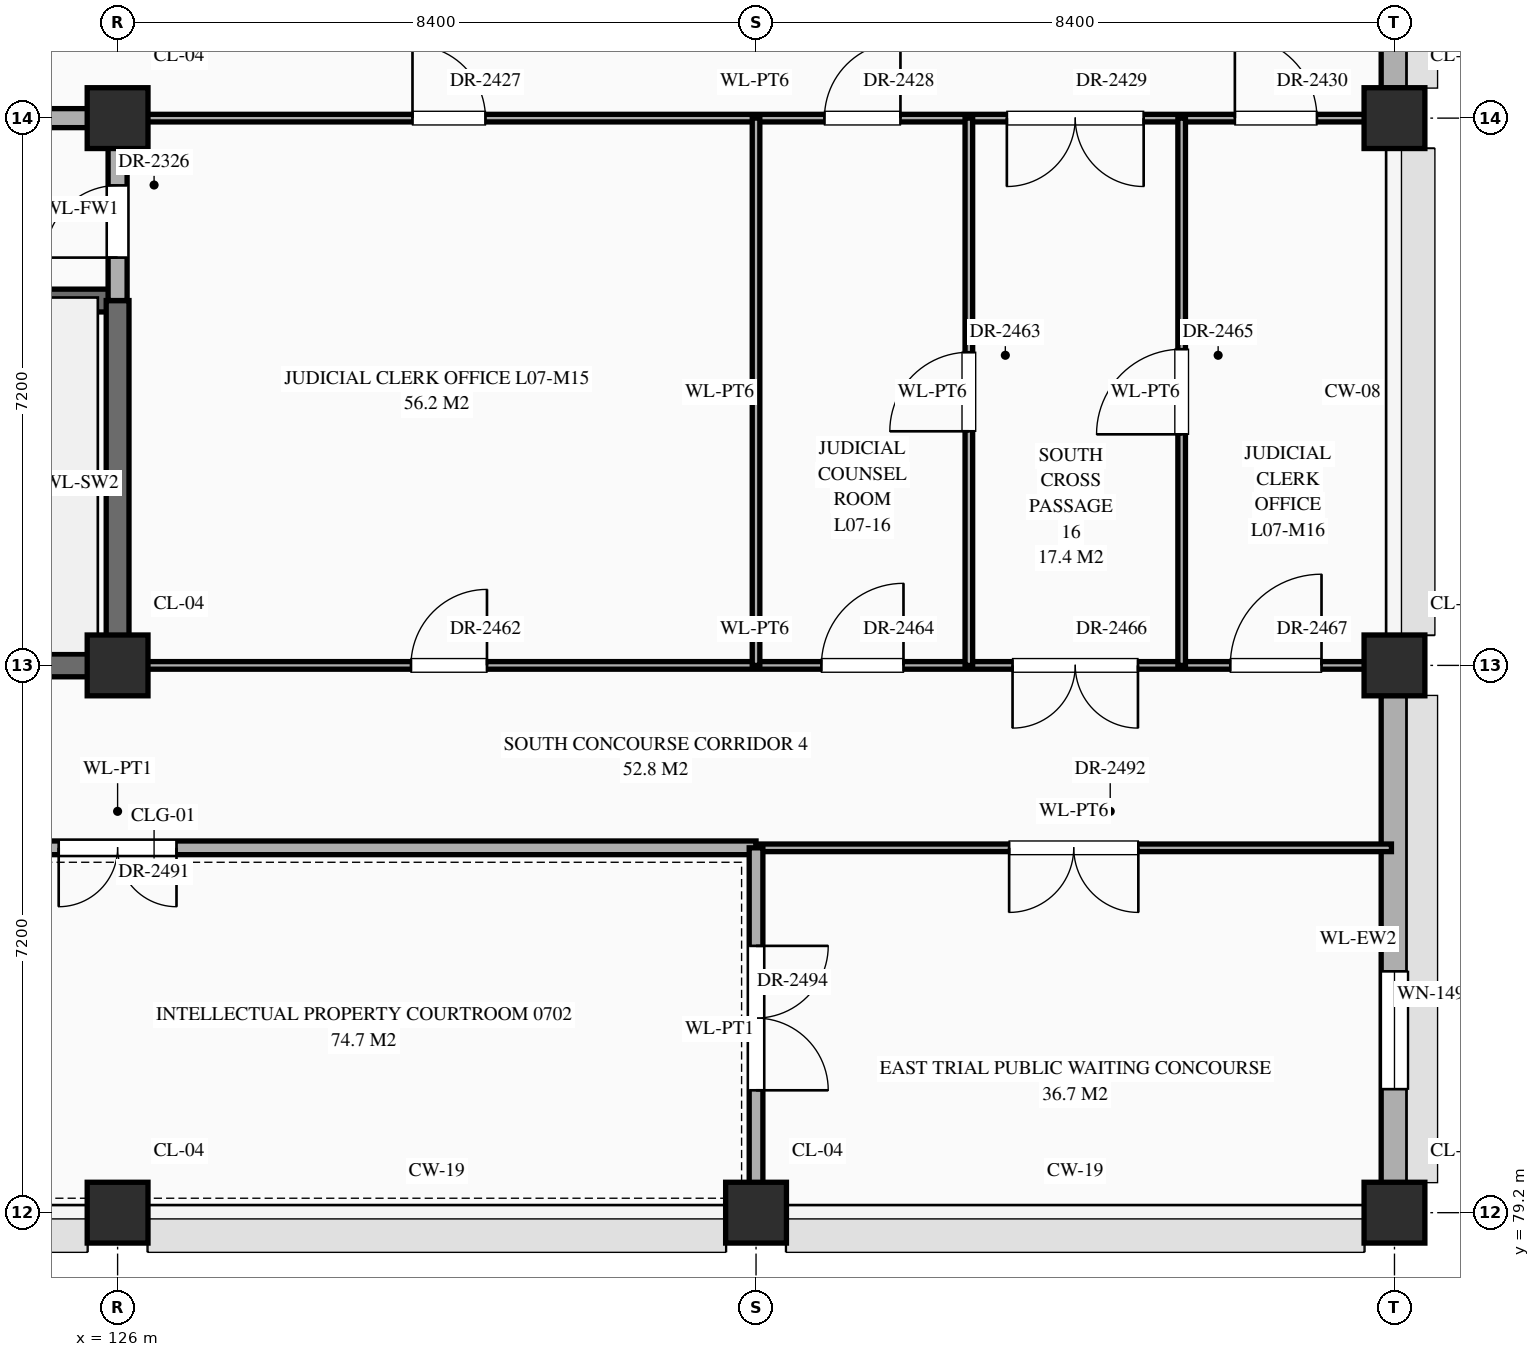
"""IFC4 building model, lengths in metres.
Left out: names, types, materials, properties, quantities, classifications, styles, units other than length and angle.
Written with IfcOpenShell. Run it as: python <this file> out.ifc"""

import sys

from ifc_helpers import new_model, si_unit, direction, frame, frame_2d, origin, origin_2d, place, context, subcontext, project, spatial, rectangle, extrude, element, fill, save


model = new_model("IFC4")
c1 = context("Model", 3, precision=1e-05, world=origin(), true_north=direction((0.0, 1.0)))
c2 = subcontext(c1, "Body", "Model", "MODEL_VIEW")
j1 = project(units=[si_unit("LENGTHUNIT", "METRE"), si_unit("PLANEANGLEUNIT", "RADIAN")], contexts=[c1])
p1 = place(None, origin())
s1 = spatial("IfcSite", under=j1, at=p1, CompositionType="ELEMENT")
p2 = place(p1, origin())
s2 = spatial("IfcBuilding", under=s1, at=p2, CompositionType="ELEMENT")
p3 = place(p2, frame((0.0, 0.0, 30.6)))
s3 = spatial("IfcBuildingStorey", under=s2, at=p3, CompositionType="ELEMENT", Elevation=30.6)
for number, where, z_axis, x_axis in (
    (1, (126.0, 79.2, 0.0), (0.0, 0.0, 1.0), (1.0, 0.0, 0.0)),
    (2, (126.0, 86.4, 0.0), (0.0, 0.0, 1.0), (1.0, 0.0, 0.0)),
    (3, (126.0, 93.6, 0.0), (0.0, 0.0, 1.0), (1.0, 0.0, 0.0)),
    (4, (134.4, 79.2, 0.0), (0.0, 0.0, 1.0), (1.0, 0.0, 0.0)),
    (5, (142.8, 79.2, 0.0), (0.0, 0.0, 1.0), (1.0, 0.0, 0.0)),
    (6, (142.8, 86.4, 0.0), (0.0, 0.0, 1.0), (1.0, 0.0, 0.0)),
    (7, (142.8, 93.6, 0.0), (0.0, 0.0, 1.0), (1.0, 0.0, 0.0)),
):
    element("IfcColumn", number, at=place(p3, frame(where, z_axis=z_axis, x_axis=x_axis)), inside=s3, PredefinedType="COLUMN", context=c2, shape_type="SweptSolid", body=[
        extrude(rectangle(XDim=0.8, YDim=0.8, at=origin_2d()), origin(), (0.0, 0.0, 1.0), 4.5),
    ])
p4 = place(p3, frame((142.8, 79.595, 0.0), z_axis=(0.0, 0.0, 1.0), x_axis=(0.0, 1.0, 0.0)))
e8 = element("IfcWall", 8, at=p4, inside=s3, PredefinedType="STANDARD", context=c2, shape_type="SweptSolid", body=[
    extrude(rectangle(XDim=6.41, YDim=0.35, at=frame_2d((3.205, 0.0))), origin(), (0.0, 0.0, 1.0), 3.65),
])
p5 = place(p4, frame((1.23, 0.0, 0.85)))
e9 = element("IfcOpeningElement", 9, at=p5, cuts=e8, PredefinedType="OPENING", context=c2, shape_type="SweptSolid", body=[
    extrude(rectangle(XDim=1.55, YDim=1.74, at=frame_2d((0.775, 0.87))), frame((0.0, 0.187, 0.0), z_axis=(0.0, -1.0, 0.0), x_axis=(1.0, 0.0, 0.0)), (0.0, 0.0, 1.0), 0.374),
])
p6 = place(p3, frame((142.8, 93.995, 0.0), z_axis=(0.0, 0.0, 1.0), x_axis=(0.0, 1.0, 0.0)))
e10 = element("IfcWall", 10, at=p6, inside=s3, PredefinedType="STANDARD", context=c2, shape_type="SweptSolid", body=[
    extrude(rectangle(XDim=6.41, YDim=0.35, at=frame_2d((3.205, 0.0))), origin(), (0.0, 0.0, 1.0), 3.65),
])
p7 = place(p6, frame((4.055, 0.0, 0.85)))
e11 = element("IfcOpeningElement", 11, at=p7, cuts=e10, PredefinedType="OPENING", context=c2, shape_type="SweptSolid", body=[
    extrude(rectangle(XDim=0.9, YDim=2.12, at=frame_2d((0.45, 1.06))), frame((0.0, 0.187, 0.0), z_axis=(0.0, -1.0, 0.0), x_axis=(1.0, 0.0, 0.0)), (0.0, 0.0, 1.0), 0.374),
])
p8 = place(p3, frame((117.6, 84.0, 0.0), z_axis=(0.0, 0.0, 1.0), x_axis=(1.0, 0.0, 0.0)))
e12 = element("IfcWall", 12, at=p8, inside=s3, PredefinedType="STANDARD", context=c2, shape_type="SweptSolid", body=[
    extrude(rectangle(XDim=16.8, YDim=0.18, at=frame_2d((8.4, 0.0))), origin(), (0.0, 0.0, 1.0), 4.24),
])
p9 = place(p8, frame((7.625, 0.0, 0.0)))
e13 = element("IfcOpeningElement", 13, at=p9, cuts=e12, PredefinedType="OPENING", context=c2, shape_type="SweptSolid", body=[
    extrude(rectangle(XDim=1.55, YDim=2.35, at=frame_2d((0.775, 1.175))), frame((0.0, 0.102, 0.0), z_axis=(0.0, -1.0, 0.0), x_axis=(1.0, 0.0, 0.0)), (0.0, 0.0, 1.0), 0.204),
])
p10 = place(p3, frame((134.4, 84.0, 0.0), z_axis=(0.0, 0.0, 1.0), x_axis=(1.0, 0.0, 0.0)))
e14 = element("IfcWall", 14, at=p10, inside=s3, PredefinedType="STANDARD", context=c2, shape_type="SweptSolid", body=[
    extrude(rectangle(XDim=8.36, YDim=0.1, at=frame_2d((4.18, 0.0))), origin(), (0.0, 0.0, 1.0), 4.3),
])
p11 = place(p10, frame((3.33, 0.0, 0.0)))
e15 = element("IfcOpeningElement", 15, at=p11, cuts=e14, PredefinedType="OPENING", context=c2, shape_type="SweptSolid", body=[
    extrude(rectangle(XDim=1.7, YDim=2.45, at=frame_2d((0.85, 1.225))), frame((0.0, 0.062, 0.0), z_axis=(0.0, -1.0, 0.0), x_axis=(1.0, 0.0, 0.0)), (0.0, 0.0, 1.0), 0.124),
])
p12 = place(p3, frame((117.6, 86.4, 0.0), z_axis=(0.0, 0.0, 1.0), x_axis=(1.0, 0.0, 0.0)))
e16 = element("IfcWall", 16, at=p12, inside=s3, PredefinedType="SHEAR", context=c2, shape_type="SweptSolid", body=[
    extrude(rectangle(XDim=8.4, YDim=0.3, at=frame_2d((4.2, 0.0))), origin(), (0.0, 0.0, 1.0), 4.24),
])
p13 = place(p3, frame((126.0, 86.4, 0.0), z_axis=(0.0, 0.0, 1.0), x_axis=(1.0, 0.0, 0.0)))
e17 = element("IfcWall", 17, at=p13, inside=s3, PredefinedType="STANDARD", context=c2, shape_type="SweptSolid", body=[
    extrude(rectangle(XDim=16.76, YDim=0.1, at=frame_2d((8.38, 0.0))), origin(), (0.0, 0.0, 1.0), 3.1),
])
p14 = place(p13, frame((3.86, 0.0, 0.0)))
e18 = element("IfcOpeningElement", 18, at=p14, cuts=e17, PredefinedType="OPENING", context=c2, shape_type="SweptSolid", body=[
    extrude(rectangle(XDim=1.0, YDim=2.25, at=frame_2d((0.5, 1.125))), frame((0.0, 0.062, 0.0), z_axis=(0.0, -1.0, 0.0), x_axis=(1.0, 0.0, 0.0)), (0.0, 0.0, 1.0), 0.124),
])
p15 = place(p13, frame((9.26, 0.0, 0.0)))
e19 = element("IfcOpeningElement", 19, at=p15, cuts=e17, PredefinedType="OPENING", context=c2, shape_type="SweptSolid", body=[
    extrude(rectangle(XDim=1.08, YDim=2.25, at=frame_2d((0.54, 1.125))), frame((0.0, 0.062, 0.0), z_axis=(0.0, -1.0, 0.0), x_axis=(1.0, 0.0, 0.0)), (0.0, 0.0, 1.0), 0.124),
])
p16 = place(p13, frame((11.775, 0.0, 0.0)))
e20 = element("IfcOpeningElement", 20, at=p16, cuts=e17, PredefinedType="OPENING", context=c2, shape_type="SweptSolid", body=[
    extrude(rectangle(XDim=1.65, YDim=2.4, at=frame_2d((0.825, 1.2))), frame((0.0, 0.062, 0.0), z_axis=(0.0, -1.0, 0.0), x_axis=(1.0, 0.0, 0.0)), (0.0, 0.0, 1.0), 0.124),
])
p17 = place(p13, frame((14.64, 0.0, 0.0)))
e21 = element("IfcOpeningElement", 21, at=p17, cuts=e17, PredefinedType="OPENING", context=c2, shape_type="SweptSolid", body=[
    extrude(rectangle(XDim=1.2, YDim=2.35, at=frame_2d((0.6, 1.175))), frame((0.0, 0.062, 0.0), z_axis=(0.0, -1.0, 0.0), x_axis=(1.0, 0.0, 0.0)), (0.0, 0.0, 1.0), 0.124),
])
p18 = place(p3, frame((117.6, 91.2, 0.0), z_axis=(0.0, 0.0, 1.0), x_axis=(1.0, 0.0, 0.0)))
e22 = element("IfcWall", 22, at=p18, inside=s3, PredefinedType="SHEAR", context=c2, shape_type="SweptSolid", body=[
    extrude(rectangle(XDim=8.4, YDim=0.3, at=frame_2d((4.2, 0.0))), origin(), (0.0, 0.0, 1.0), 4.24),
])
p19 = place(p18, frame((0.65, 0.0, 0.0)))
e23 = element("IfcOpeningElement", 23, at=p19, cuts=e22, PredefinedType="OPENING", context=c2, shape_type="SweptSolid", body=[
    extrude(rectangle(XDim=1.1, YDim=2.2, at=frame_2d((0.55, 1.1))), frame((0.0, 0.162, 0.0), z_axis=(0.0, -1.0, 0.0), x_axis=(1.0, 0.0, 0.0)), (0.0, 0.0, 1.0), 0.324),
])
p20 = place(p3, frame((117.6, 93.6, 0.0), z_axis=(0.0, 0.0, 1.0), x_axis=(1.0, 0.0, 0.0)))
e24 = element("IfcWall", 24, at=p20, inside=s3, PredefinedType="STANDARD", context=c2, shape_type="SweptSolid", body=[
    extrude(rectangle(XDim=8.4, YDim=0.25, at=frame_2d((4.2, 0.0))), origin(), (0.0, 0.0, 1.0), 3.39),
])
p21 = place(p20, frame((3.2, 0.0, 0.0)))
e25 = element("IfcOpeningElement", 25, at=p21, cuts=e24, PredefinedType="OPENING", context=c2, shape_type="SweptSolid", body=[
    extrude(rectangle(XDim=2.0, YDim=2.4, at=frame_2d((1.0, 1.2))), frame((0.0, 0.137, 0.0), z_axis=(0.0, -1.0, 0.0), x_axis=(1.0, 0.0, 0.0)), (0.0, 0.0, 1.0), 0.274),
])
p22 = place(p3, frame((126.0, 93.6, 0.0), z_axis=(0.0, 0.0, 1.0), x_axis=(1.0, 0.0, 0.0)))
e26 = element("IfcWall", 26, at=p22, inside=s3, PredefinedType="STANDARD", context=c2, shape_type="SweptSolid", body=[
    extrude(rectangle(XDim=16.76, YDim=0.1, at=frame_2d((8.38, 0.0))), origin(), (0.0, 0.0, 1.0), 3.1),
])
p23 = place(p22, frame((3.88, 0.0, 0.0)))
e27 = element("IfcOpeningElement", 27, at=p23, cuts=e26, PredefinedType="OPENING", context=c2, shape_type="SweptSolid", body=[
    extrude(rectangle(XDim=0.96, YDim=2.2, at=frame_2d((0.48, 1.1))), frame((0.0, 0.062, 0.0), z_axis=(0.0, -1.0, 0.0), x_axis=(1.0, 0.0, 0.0)), (0.0, 0.0, 1.0), 0.124),
])
p24 = place(p22, frame((9.3, 0.0, 0.0)))
e28 = element("IfcOpeningElement", 28, at=p24, cuts=e26, PredefinedType="OPENING", context=c2, shape_type="SweptSolid", body=[
    extrude(rectangle(XDim=1.0, YDim=2.25, at=frame_2d((0.5, 1.125))), frame((0.0, 0.062, 0.0), z_axis=(0.0, -1.0, 0.0), x_axis=(1.0, 0.0, 0.0)), (0.0, 0.0, 1.0), 0.124),
])
p25 = place(p22, frame((11.7, 0.0, 0.0)))
e29 = element("IfcOpeningElement", 29, at=p25, cuts=e26, PredefinedType="OPENING", context=c2, shape_type="SweptSolid", body=[
    extrude(rectangle(XDim=1.8, YDim=2.5, at=frame_2d((0.9, 1.25))), frame((0.0, 0.062, 0.0), z_axis=(0.0, -1.0, 0.0), x_axis=(1.0, 0.0, 0.0)), (0.0, 0.0, 1.0), 0.124),
])
p26 = place(p22, frame((14.7, 0.0, 0.0)))
e30 = element("IfcOpeningElement", 30, at=p26, cuts=e26, PredefinedType="OPENING", context=c2, shape_type="SweptSolid", body=[
    extrude(rectangle(XDim=1.08, YDim=2.25, at=frame_2d((0.54, 1.125))), frame((0.0, 0.062, 0.0), z_axis=(0.0, -1.0, 0.0), x_axis=(1.0, 0.0, 0.0)), (0.0, 0.0, 1.0), 0.124),
])
p27 = place(p3, frame((126.0, 86.4, 0.0), z_axis=(0.0, 0.0, 1.0), x_axis=(0.0, 1.0, 0.0)))
e31 = element("IfcWall", 31, at=p27, inside=s3, PredefinedType="SHEAR", context=c2, shape_type="SweptSolid", body=[
    extrude(rectangle(XDim=4.8, YDim=0.3, at=frame_2d((2.4, 0.0))), origin(), (0.0, 0.0, 1.0), 4.24),
])
p28 = place(p3, frame((126.0, 91.2, 0.0), z_axis=(0.0, 0.0, 1.0), x_axis=(0.0, 1.0, 0.0)))
e32 = element("IfcWall", 32, at=p28, inside=s3, PredefinedType="STANDARD", context=c2, shape_type="SweptSolid", body=[
    extrude(rectangle(XDim=2.4, YDim=0.25, at=frame_2d((1.2, 0.0))), origin(), (0.0, 0.0, 1.0), 3.4),
])
p29 = place(p28, frame((0.565, 0.0, 0.0)))
e33 = element("IfcOpeningElement", 33, at=p29, cuts=e32, PredefinedType="OPENING", context=c2, shape_type="SweptSolid", body=[
    extrude(rectangle(XDim=0.95, YDim=2.15, at=frame_2d((0.475, 1.075))), frame((0.0, 0.137, 0.0), z_axis=(0.0, -1.0, 0.0), x_axis=(1.0, 0.0, 0.0)), (0.0, 0.0, 1.0), 0.274),
])
p30 = place(p3, frame((134.4, 79.24, 0.0), z_axis=(0.0, 0.0, 1.0), x_axis=(0.0, 1.0, 0.0)))
e34 = element("IfcWall", 34, at=p30, inside=s3, PredefinedType="STANDARD", context=c2, shape_type="SweptSolid", body=[
    extrude(rectangle(XDim=4.76, YDim=0.18, at=frame_2d((2.38, 0.0))), origin(), (0.0, 0.0, 1.0), 4.15),
])
p31 = place(p30, frame((1.57, 0.0, 0.0)))
e35 = element("IfcOpeningElement", 35, at=p31, cuts=e34, PredefinedType="OPENING", context=c2, shape_type="SweptSolid", body=[
    extrude(rectangle(XDim=1.9, YDim=2.5, at=frame_2d((0.95, 1.25))), frame((0.0, 0.102, 0.0), z_axis=(0.0, -1.0, 0.0), x_axis=(1.0, 0.0, 0.0)), (0.0, 0.0, 1.0), 0.204),
])
p32 = place(p3, frame((134.4, 86.4, 0.0), z_axis=(0.0, 0.0, 1.0), x_axis=(0.0, 1.0, 0.0)))
e36 = element("IfcWall", 36, at=p32, inside=s3, PredefinedType="STANDARD", context=c2, shape_type="SweptSolid", body=[
    extrude(rectangle(XDim=7.2, YDim=0.1, at=frame_2d((3.6, 0.0))), origin(), (0.0, 0.0, 1.0), 4.15),
])
p33 = place(p3, frame((137.2, 86.4, 0.0), z_axis=(0.0, 0.0, 1.0), x_axis=(0.0, 1.0, 0.0)))
e37 = element("IfcWall", 37, at=p33, inside=s3, PredefinedType="STANDARD", context=c2, shape_type="SweptSolid", body=[
    extrude(rectangle(XDim=7.2, YDim=0.1, at=frame_2d((3.6, 0.0))), origin(), (0.0, 0.0, 1.0), 4.3),
])
p34 = place(p33, frame((3.08, 0.0, 0.0)))
e38 = element("IfcOpeningElement", 38, at=p34, cuts=e37, PredefinedType="OPENING", context=c2, shape_type="SweptSolid", body=[
    extrude(rectangle(XDim=1.04, YDim=2.2, at=frame_2d((0.52, 1.1))), frame((0.0, 0.062, 0.0), z_axis=(0.0, -1.0, 0.0), x_axis=(1.0, 0.0, 0.0)), (0.0, 0.0, 1.0), 0.124),
])
p35 = place(p3, frame((140.0, 86.4, 0.0), z_axis=(0.0, 0.0, 1.0), x_axis=(0.0, 1.0, 0.0)))
e39 = element("IfcWall", 39, at=p35, inside=s3, PredefinedType="STANDARD", context=c2, shape_type="SweptSolid", body=[
    extrude(rectangle(XDim=7.2, YDim=0.1, at=frame_2d((3.6, 0.0))), origin(), (0.0, 0.0, 1.0), 4.3),
])
p36 = place(p35, frame((3.04, 0.0, 0.0)))
e40 = element("IfcOpeningElement", 40, at=p36, cuts=e39, PredefinedType="OPENING", context=c2, shape_type="SweptSolid", body=[
    extrude(rectangle(XDim=1.12, YDim=2.25, at=frame_2d((0.56, 1.125))), frame((0.0, 0.062, 0.0), z_axis=(0.0, -1.0, 0.0), x_axis=(1.0, 0.0, 0.0)), (0.0, 0.0, 1.0), 0.124),
])
p37 = place(p5, origin())
e41 = element("IfcWindow", 41, at=p37, inside=s3, PartitioningType="SINGLE_PANEL", PredefinedType="WINDOW", context=c2, shape_type="SweptSolid", body=[
    extrude(rectangle(XDim=1.55, YDim=1.74, at=frame_2d((0.775, 0.87))), frame((0.0, 0.03, 0.0), z_axis=(0.0, -1.0, 0.0), x_axis=(1.0, 0.0, 0.0)), (0.0, 0.0, 1.0), 0.06),
])
fill(e9, e41)
p38 = place(p29, origin())
e42 = element("IfcDoor", 42, at=p38, inside=s3, OperationType="SINGLE_SWING_LEFT", PredefinedType="DOOR", context=c2, shape_type="SweptSolid", body=[
    extrude(rectangle(XDim=0.95, YDim=2.15, at=frame_2d((0.475, 1.075))), frame((0.0, 0.025, 0.0), z_axis=(0.0, -1.0, 0.0), x_axis=(1.0, 0.0, 0.0)), (0.0, 0.0, 1.0), 0.05),
])
fill(e33, e42)
p39 = place(p23, origin())
e43 = element("IfcDoor", 43, at=p39, inside=s3, OperationType="SINGLE_SWING_LEFT", PredefinedType="DOOR", context=c2, shape_type="SweptSolid", body=[
    extrude(rectangle(XDim=0.96, YDim=2.2, at=frame_2d((0.48, 1.1))), frame((0.0, 0.025, 0.0), z_axis=(0.0, -1.0, 0.0), x_axis=(1.0, 0.0, 0.0)), (0.0, 0.0, 1.0), 0.05),
])
fill(e27, e43)
p40 = place(p24, origin())
e44 = element("IfcDoor", 44, at=p40, inside=s3, OperationType="SINGLE_SWING_RIGHT", PredefinedType="DOOR", context=c2, shape_type="SweptSolid", body=[
    extrude(rectangle(XDim=1.0, YDim=2.25, at=frame_2d((0.5, 1.125))), frame((0.0, 0.025, 0.0), z_axis=(0.0, -1.0, 0.0), x_axis=(1.0, 0.0, 0.0)), (0.0, 0.0, 1.0), 0.05),
])
fill(e28, e44)
p41 = place(p25, frame((1.8, 0.0, 0.0), z_axis=(0.0, 0.0, 1.0), x_axis=(-1.0, 0.0, 0.0)))
e45 = element("IfcDoor", 45, at=p41, inside=s3, OperationType="DOUBLE_DOOR_SINGLE_SWING", PredefinedType="DOOR", context=c2, shape_type="SweptSolid", body=[
    extrude(rectangle(XDim=1.8, YDim=2.5, at=frame_2d((0.9, 1.25))), frame((0.0, 0.025, 0.0), z_axis=(0.0, -1.0, 0.0), x_axis=(1.0, 0.0, 0.0)), (0.0, 0.0, 1.0), 0.05),
])
fill(e29, e45)
p42 = place(p26, origin())
e46 = element("IfcDoor", 46, at=p42, inside=s3, OperationType="SINGLE_SWING_LEFT", PredefinedType="DOOR", context=c2, shape_type="SweptSolid", body=[
    extrude(rectangle(XDim=1.08, YDim=2.25, at=frame_2d((0.54, 1.125))), frame((0.0, 0.025, 0.0), z_axis=(0.0, -1.0, 0.0), x_axis=(1.0, 0.0, 0.0)), (0.0, 0.0, 1.0), 0.05),
])
fill(e30, e46)
p43 = place(p14, origin())
e47 = element("IfcDoor", 47, at=p43, inside=s3, OperationType="SINGLE_SWING_RIGHT", PredefinedType="DOOR", context=c2, shape_type="SweptSolid", body=[
    extrude(rectangle(XDim=1.0, YDim=2.25, at=frame_2d((0.5, 1.125))), frame((0.0, 0.025, 0.0), z_axis=(0.0, -1.0, 0.0), x_axis=(1.0, 0.0, 0.0)), (0.0, 0.0, 1.0), 0.05),
])
fill(e18, e47)
p44 = place(p34, origin())
e48 = element("IfcDoor", 48, at=p44, inside=s3, OperationType="SINGLE_SWING_LEFT", PredefinedType="DOOR", context=c2, shape_type="SweptSolid", body=[
    extrude(rectangle(XDim=1.04, YDim=2.2, at=frame_2d((0.52, 1.1))), frame((0.0, 0.025, 0.0), z_axis=(0.0, -1.0, 0.0), x_axis=(1.0, 0.0, 0.0)), (0.0, 0.0, 1.0), 0.05),
])
fill(e38, e48)
p45 = place(p15, origin())
e49 = element("IfcDoor", 49, at=p45, inside=s3, OperationType="SINGLE_SWING_RIGHT", PredefinedType="DOOR", context=c2, shape_type="SweptSolid", body=[
    extrude(rectangle(XDim=1.08, YDim=2.25, at=frame_2d((0.54, 1.125))), frame((0.0, 0.025, 0.0), z_axis=(0.0, -1.0, 0.0), x_axis=(1.0, 0.0, 0.0)), (0.0, 0.0, 1.0), 0.05),
])
fill(e19, e49)
p46 = place(p36, origin())
e50 = element("IfcDoor", 50, at=p46, inside=s3, OperationType="SINGLE_SWING_LEFT", PredefinedType="DOOR", context=c2, shape_type="SweptSolid", body=[
    extrude(rectangle(XDim=1.12, YDim=2.25, at=frame_2d((0.56, 1.125))), frame((0.0, 0.025, 0.0), z_axis=(0.0, -1.0, 0.0), x_axis=(1.0, 0.0, 0.0)), (0.0, 0.0, 1.0), 0.05),
])
fill(e40, e50)
p47 = place(p16, frame((1.65, 0.0, 0.0), z_axis=(0.0, 0.0, 1.0), x_axis=(-1.0, 0.0, 0.0)))
e51 = element("IfcDoor", 51, at=p47, inside=s3, OperationType="DOUBLE_DOOR_SINGLE_SWING", PredefinedType="DOOR", context=c2, shape_type="SweptSolid", body=[
    extrude(rectangle(XDim=1.65, YDim=2.4, at=frame_2d((0.825, 1.2))), frame((0.0, 0.025, 0.0), z_axis=(0.0, -1.0, 0.0), x_axis=(1.0, 0.0, 0.0)), (0.0, 0.0, 1.0), 0.05),
])
fill(e20, e51)
p48 = place(p17, origin())
e52 = element("IfcDoor", 52, at=p48, inside=s3, OperationType="SINGLE_SWING_RIGHT", PredefinedType="DOOR", context=c2, shape_type="SweptSolid", body=[
    extrude(rectangle(XDim=1.2, YDim=2.35, at=frame_2d((0.6, 1.175))), frame((0.0, 0.025, 0.0), z_axis=(0.0, -1.0, 0.0), x_axis=(1.0, 0.0, 0.0)), (0.0, 0.0, 1.0), 0.05),
])
fill(e21, e52)
p49 = place(p9, frame((1.55, 0.0, 0.0), z_axis=(0.0, 0.0, 1.0), x_axis=(-1.0, 0.0, 0.0)))
e53 = element("IfcDoor", 53, at=p49, inside=s3, OperationType="DOUBLE_DOOR_SINGLE_SWING", PredefinedType="DOOR", context=c2, shape_type="SweptSolid", body=[
    extrude(rectangle(XDim=1.55, YDim=2.35, at=frame_2d((0.775, 1.175))), frame((0.0, 0.025, 0.0), z_axis=(0.0, -1.0, 0.0), x_axis=(1.0, 0.0, 0.0)), (0.0, 0.0, 1.0), 0.05),
])
fill(e13, e53)
p50 = place(p11, frame((1.7, 0.0, 0.0), z_axis=(0.0, 0.0, 1.0), x_axis=(-1.0, 0.0, 0.0)))
e54 = element("IfcDoor", 54, at=p50, inside=s3, OperationType="DOUBLE_DOOR_SINGLE_SWING", PredefinedType="DOOR", context=c2, shape_type="SweptSolid", body=[
    extrude(rectangle(XDim=1.7, YDim=2.45, at=frame_2d((0.85, 1.225))), frame((0.0, 0.025, 0.0), z_axis=(0.0, -1.0, 0.0), x_axis=(1.0, 0.0, 0.0)), (0.0, 0.0, 1.0), 0.05),
])
fill(e15, e54)
p51 = place(p31, frame((1.9, 0.0, 0.0), z_axis=(0.0, 0.0, 1.0), x_axis=(-1.0, 0.0, 0.0)))
e55 = element("IfcDoor", 55, at=p51, inside=s3, OperationType="DOUBLE_DOOR_SINGLE_SWING", PredefinedType="DOOR", context=c2, shape_type="SweptSolid", body=[
    extrude(rectangle(XDim=1.9, YDim=2.5, at=frame_2d((0.95, 1.25))), frame((0.0, 0.025, 0.0), z_axis=(0.0, -1.0, 0.0), x_axis=(1.0, 0.0, 0.0)), (0.0, 0.0, 1.0), 0.05),
])
fill(e35, e55)
save(model, sys.argv[1])
